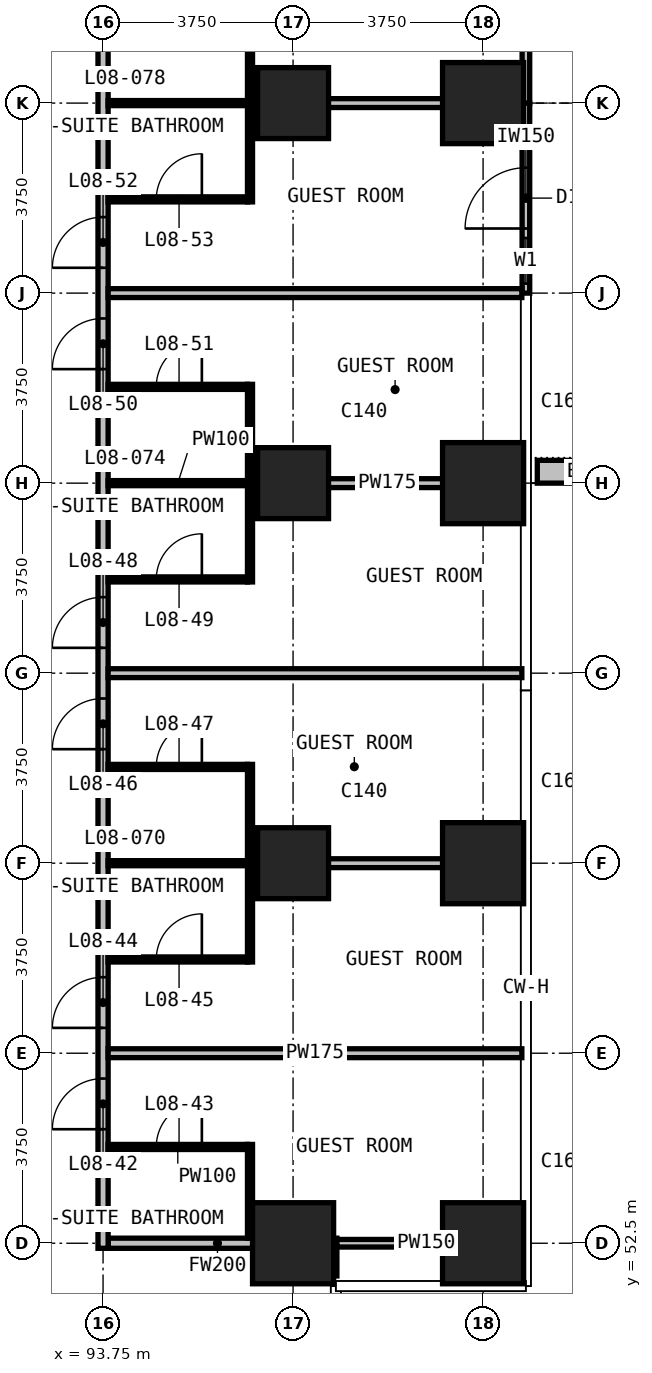
"""IFC4 building model, lengths in metres.
Left out: names, types, materials, properties, quantities, classifications, styles, units other than length and angle.
Written with IfcOpenShell. Run it as: python <this file> out.ifc"""

import sys

from ifc_helpers import new_model, si_unit, direction, frame, frame_2d, origin, origin_2d, place, context, subcontext, project, spatial, rectangle, extrude, element, fill, save


model = new_model("IFC4")
c1 = context("Model", 3, precision=1e-05, world=origin(), true_north=direction((0.0, 1.0)))
c2 = subcontext(c1, "Body", "Model", "MODEL_VIEW")
j1 = project(units=[si_unit("LENGTHUNIT", "METRE"), si_unit("PLANEANGLEUNIT", "RADIAN")], contexts=[c1])
p1 = place(None, origin())
s1 = spatial("IfcSite", under=j1, at=p1, CompositionType="ELEMENT")
p2 = place(p1, origin())
s2 = spatial("IfcBuilding", under=s1, at=p2, CompositionType="ELEMENT")
p3 = place(p2, frame((0.0, 0.0, 46.1)))
s3 = spatial("IfcBuildingStorey", under=s2, at=p3, CompositionType="ELEMENT", Elevation=46.1)
p4 = place(p3, frame((97.5, 52.5, 0.0), z_axis=(0.0, 0.0, 1.0), x_axis=(1.0, 0.0, 0.0)))
e1 = element("IfcColumn", 1, at=p4, inside=s3, PredefinedType="COLUMN", context=c2, shape_type="SweptSolid", body=[
    extrude(rectangle(XDim=1.6, YDim=1.6, at=origin_2d()), origin(), (0.0, 0.0, 1.0), 3.3),
])
for number, where, z_axis, x_axis in (
    (2, (97.5, 60.0, 0.0), (0.0, 0.0, 1.0), (1.0, 0.0, 0.0)),
    (3, (97.5, 67.5, 0.0), (0.0, 0.0, 1.0), (1.0, 0.0, 0.0)),
    (4, (97.5, 75.0, 0.0), (0.0, 0.0, 1.0), (1.0, 0.0, 0.0)),
):
    element("IfcColumn", number, at=place(p3, frame(where, z_axis=z_axis, x_axis=x_axis)), inside=s3, PredefinedType="COLUMN", context=c2, shape_type="SweptSolid", body=[
        extrude(rectangle(XDim=1.4, YDim=1.4, at=origin_2d()), origin(), (0.0, 0.0, 1.0), 3.3),
    ])
for number, where, z_axis, x_axis in (
    (5, (101.25, 52.5, 0.0), (0.0, 0.0, 1.0), (1.0, 0.0, 0.0)),
    (6, (101.25, 60.0, 0.0), (0.0, 0.0, 1.0), (1.0, 0.0, 0.0)),
    (7, (101.25, 67.5, 0.0), (0.0, 0.0, 1.0), (1.0, 0.0, 0.0)),
    (8, (101.25, 75.0, 0.0), (0.0, 0.0, 1.0), (1.0, 0.0, 0.0)),
):
    element("IfcColumn", number, at=place(p3, frame(where, z_axis=z_axis, x_axis=x_axis)), inside=s3, PredefinedType="COLUMN", context=c2, shape_type="SweptSolid", body=[
        extrude(rectangle(XDim=1.6, YDim=1.6, at=origin_2d()), origin(), (0.0, 0.0, 1.0), 3.3),
    ])
p5 = place(p3, frame((102.095, 71.25, 0.0), z_axis=(0.0, 0.0, 1.0), x_axis=(0.0, 1.0, 0.0)))
e9 = element("IfcWall", 9, at=p5, inside=s3, PredefinedType="SOLIDWALL", context=c2, shape_type="SweptSolid", body=[
    extrude(rectangle(XDim=3.75, YDim=0.15, at=frame_2d((1.875, 0.0))), origin(), (0.0, 0.0, 1.0), 3.0),
])
p6 = place(p5, frame((0.188, 0.0, 0.1)))
e10 = element("IfcOpeningElement", 10, at=p6, cuts=e9, PredefinedType="OPENING", context=c2, shape_type="SweptSolid", body=[
    extrude(rectangle(XDim=0.9, YDim=2.4, at=frame_2d((0.45, 1.2))), frame((0.0, 0.085, 0.0), z_axis=(0.0, -1.0, 0.0), x_axis=(1.0, 0.0, 0.0)), (0.0, 0.0, 1.0), 0.17),
])
p7 = place(p5, frame((1.275, 0.0, 0.0)))
e11 = element("IfcOpeningElement", 11, at=p7, cuts=e9, PredefinedType="OPENING", context=c2, shape_type="SweptSolid", body=[
    extrude(rectangle(XDim=1.2, YDim=2.4, at=frame_2d((0.6, 1.2))), frame((0.0, 0.085, 0.0), z_axis=(0.0, -1.0, 0.0), x_axis=(1.0, 0.0, 0.0)), (0.0, 0.0, 1.0), 0.17),
])
p8 = place(p3, frame((102.095, 75.0, 0.0), z_axis=(0.0, 0.0, 1.0), x_axis=(0.0, 1.0, 0.0)))
e12 = element("IfcWall", 12, at=p8, inside=s3, PredefinedType="SOLIDWALL", context=c2, shape_type="SweptSolid", body=[
    extrude(rectangle(XDim=3.75, YDim=0.15, at=frame_2d((1.875, 0.0))), origin(), (0.0, 0.0, 1.0), 3.0),
])
p9 = place(p8, frame((1.275, 0.0, 0.0)))
e13 = element("IfcOpeningElement", 13, at=p9, cuts=e12, PredefinedType="OPENING", context=c2, shape_type="SweptSolid", body=[
    extrude(rectangle(XDim=1.2, YDim=2.4, at=frame_2d((0.6, 1.2))), frame((0.0, 0.085, 0.0), z_axis=(0.0, -1.0, 0.0), x_axis=(1.0, 0.0, 0.0)), (0.0, 0.0, 1.0), 0.17),
])
p10 = place(p8, frame((2.663, 0.0, 0.1)))
e14 = element("IfcOpeningElement", 14, at=p10, cuts=e12, PredefinedType="OPENING", context=c2, shape_type="SweptSolid", body=[
    extrude(rectangle(XDim=0.9, YDim=2.4, at=frame_2d((0.45, 1.2))), frame((0.0, 0.085, 0.0), z_axis=(0.0, -1.0, 0.0), x_axis=(1.0, 0.0, 0.0)), (0.0, 0.0, 1.0), 0.17),
])
p11 = place(p3, frame((102.32, 67.725, 0.0), z_axis=(0.0, 0.0, 1.0), x_axis=(1.0, 0.0, 0.0)))
e15 = element("IfcWall", 15, at=p11, inside=s3, PredefinedType="USERDEFINED", context=c2, shape_type="SweptSolid", body=[
    extrude(rectangle(XDim=2.33, YDim=0.45, at=frame_2d((1.165, 0.0))), origin(), (0.0, 0.0, 1.0), 1.1),
])
p12 = place(p3, frame((93.85, 52.5, 0.0), z_axis=(0.0, 0.0, 1.0), x_axis=(1.0, 0.0, 0.0)))
e16 = element("IfcWall", 16, at=p12, inside=s3, PredefinedType="PARTITIONING", context=c2, shape_type="SweptSolid", body=[
    extrude(rectangle(XDim=4.315, YDim=0.2, at=frame_2d((2.157, 0.0))), origin(), (0.0, 0.0, 1.0), 3.0),
])
p13 = place(p3, frame((93.75, 52.4, 0.0), z_axis=(0.0, 0.0, 1.0), x_axis=(0.0, 1.0, 0.0)))
e17 = element("IfcWall", 17, at=p13, inside=s3, PredefinedType="PARTITIONING", context=c2, shape_type="SweptSolid", body=[
    extrude(rectangle(XDim=33.925, YDim=0.2, at=frame_2d((16.962, 0.0))), origin(), (0.0, 0.0, 1.0), 3.0),
])
p14 = place(p13, frame((2.35, 0.0, 0.0)))
e18 = element("IfcOpeningElement", 18, at=p14, cuts=e17, PredefinedType="OPENING", context=c2, shape_type="SweptSolid", body=[
    extrude(rectangle(XDim=1.0, YDim=2.2, at=frame_2d((0.5, 1.1))), frame((0.0, 0.11, 0.0), z_axis=(0.0, -1.0, 0.0), x_axis=(1.0, 0.0, 0.0)), (0.0, 0.0, 1.0), 0.22),
])
p15 = place(p13, frame((4.35, 0.0, 0.0)))
e19 = element("IfcOpeningElement", 19, at=p15, cuts=e17, PredefinedType="OPENING", context=c2, shape_type="SweptSolid", body=[
    extrude(rectangle(XDim=1.0, YDim=2.2, at=frame_2d((0.5, 1.1))), frame((0.0, 0.11, 0.0), z_axis=(0.0, -1.0, 0.0), x_axis=(1.0, 0.0, 0.0)), (0.0, 0.0, 1.0), 0.22),
])
p16 = place(p13, frame((9.85, 0.0, 0.0)))
e20 = element("IfcOpeningElement", 20, at=p16, cuts=e17, PredefinedType="OPENING", context=c2, shape_type="SweptSolid", body=[
    extrude(rectangle(XDim=1.0, YDim=2.2, at=frame_2d((0.5, 1.1))), frame((0.0, 0.11, 0.0), z_axis=(0.0, -1.0, 0.0), x_axis=(1.0, 0.0, 0.0)), (0.0, 0.0, 1.0), 0.22),
])
p17 = place(p13, frame((11.85, 0.0, 0.0)))
e21 = element("IfcOpeningElement", 21, at=p17, cuts=e17, PredefinedType="OPENING", context=c2, shape_type="SweptSolid", body=[
    extrude(rectangle(XDim=1.0, YDim=2.2, at=frame_2d((0.5, 1.1))), frame((0.0, 0.11, 0.0), z_axis=(0.0, -1.0, 0.0), x_axis=(1.0, 0.0, 0.0)), (0.0, 0.0, 1.0), 0.22),
])
p18 = place(p13, frame((17.35, 0.0, 0.0)))
e22 = element("IfcOpeningElement", 22, at=p18, cuts=e17, PredefinedType="OPENING", context=c2, shape_type="SweptSolid", body=[
    extrude(rectangle(XDim=1.0, YDim=2.2, at=frame_2d((0.5, 1.1))), frame((0.0, 0.11, 0.0), z_axis=(0.0, -1.0, 0.0), x_axis=(1.0, 0.0, 0.0)), (0.0, 0.0, 1.0), 0.22),
])
p19 = place(p13, frame((19.35, 0.0, 0.0)))
e23 = element("IfcOpeningElement", 23, at=p19, cuts=e17, PredefinedType="OPENING", context=c2, shape_type="SweptSolid", body=[
    extrude(rectangle(XDim=1.0, YDim=2.2, at=frame_2d((0.5, 1.1))), frame((0.0, 0.11, 0.0), z_axis=(0.0, -1.0, 0.0), x_axis=(1.0, 0.0, 0.0)), (0.0, 0.0, 1.0), 0.22),
])
p20 = place(p13, frame((24.85, 0.0, 0.0)))
e24 = element("IfcOpeningElement", 24, at=p20, cuts=e17, PredefinedType="OPENING", context=c2, shape_type="SweptSolid", body=[
    extrude(rectangle(XDim=1.0, YDim=2.2, at=frame_2d((0.5, 1.1))), frame((0.0, 0.11, 0.0), z_axis=(0.0, -1.0, 0.0), x_axis=(1.0, 0.0, 0.0)), (0.0, 0.0, 1.0), 0.22),
])
p21 = place(p13, frame((26.85, 0.0, 0.0)))
e25 = element("IfcOpeningElement", 25, at=p21, cuts=e17, PredefinedType="OPENING", context=c2, shape_type="SweptSolid", body=[
    extrude(rectangle(XDim=1.0, YDim=2.2, at=frame_2d((0.5, 1.1))), frame((0.0, 0.11, 0.0), z_axis=(0.0, -1.0, 0.0), x_axis=(1.0, 0.0, 0.0)), (0.0, 0.0, 1.0), 0.22),
])
p22 = place(p13, frame((31.55, 0.0, 0.0)))
e26 = element("IfcOpeningElement", 26, at=p22, cuts=e17, PredefinedType="OPENING", context=c2, shape_type="SweptSolid", body=[
    extrude(rectangle(XDim=0.9, YDim=2.2, at=frame_2d((0.45, 1.1))), frame((0.0, 0.11, 0.0), z_axis=(0.0, -1.0, 0.0), x_axis=(1.0, 0.0, 0.0)), (0.0, 0.0, 1.0), 0.22),
])
p23 = place(p3, frame((98.265, 51.855, 0.0), z_axis=(0.0, 0.0, 1.0), x_axis=(0.0, 1.0, 0.0)))
e27 = element("IfcWall", 27, at=p23, inside=s3, PredefinedType="PARTITIONING", context=c2, shape_type="SweptSolid", body=[
    extrude(rectangle(XDim=0.745, YDim=0.2, at=frame_2d((0.373, 0.0))), origin(), (0.0, 0.0, 1.0), 3.0),
])
p24 = place(p3, frame((93.85, 56.25, 0.0), z_axis=(0.0, 0.0, 1.0), x_axis=(1.0, 0.0, 0.0)))
e28 = element("IfcWall", 28, at=p24, inside=s3, PredefinedType="PARTITIONING", context=c2, shape_type="SweptSolid", body=[
    extrude(rectangle(XDim=8.165, YDim=0.175, at=frame_2d((4.083, 0.0))), origin(), (0.0, 0.0, 1.0), 3.0),
])
p25 = place(p3, frame((96.7, 60.0, 0.0), z_axis=(0.0, 0.0, 1.0), x_axis=(1.0, 0.0, 0.0)))
e29 = element("IfcWall", 29, at=p25, inside=s3, PredefinedType="PARTITIONING", context=c2, shape_type="SweptSolid", body=[
    extrude(rectangle(XDim=5.315, YDim=0.175, at=frame_2d((2.657, 0.0))), origin(), (0.0, 0.0, 1.0), 3.0),
])
p26 = place(p3, frame((93.85, 63.75, 0.0), z_axis=(0.0, 0.0, 1.0), x_axis=(1.0, 0.0, 0.0)))
e30 = element("IfcWall", 30, at=p26, inside=s3, PredefinedType="PARTITIONING", context=c2, shape_type="SweptSolid", body=[
    extrude(rectangle(XDim=8.165, YDim=0.175, at=frame_2d((4.083, 0.0))), origin(), (0.0, 0.0, 1.0), 3.0),
])
p27 = place(p3, frame((96.7, 67.5, 0.0), z_axis=(0.0, 0.0, 1.0), x_axis=(1.0, 0.0, 0.0)))
e31 = element("IfcWall", 31, at=p27, inside=s3, PredefinedType="PARTITIONING", context=c2, shape_type="SweptSolid", body=[
    extrude(rectangle(XDim=5.315, YDim=0.175, at=frame_2d((2.657, 0.0))), origin(), (0.0, 0.0, 1.0), 3.0),
])
p28 = place(p3, frame((93.85, 71.25, 0.0), z_axis=(0.0, 0.0, 1.0), x_axis=(1.0, 0.0, 0.0)))
e32 = element("IfcWall", 32, at=p28, inside=s3, PredefinedType="PARTITIONING", context=c2, shape_type="SweptSolid", body=[
    extrude(rectangle(XDim=8.165, YDim=0.175, at=frame_2d((4.083, 0.0))), origin(), (0.0, 0.0, 1.0), 3.0),
])
p29 = place(p3, frame((96.7, 75.0, 0.0), z_axis=(0.0, 0.0, 1.0), x_axis=(1.0, 0.0, 0.0)))
e33 = element("IfcWall", 33, at=p29, inside=s3, PredefinedType="PARTITIONING", context=c2, shape_type="SweptSolid", body=[
    extrude(rectangle(XDim=5.315, YDim=0.175, at=frame_2d((2.657, 0.0))), origin(), (0.0, 0.0, 1.0), 3.0),
])
p30 = place(p3, frame((98.365, 52.5, 0.0), z_axis=(0.0, 0.0, 1.0), x_axis=(1.0, 0.0, 0.0)))
e34 = element("IfcWall", 34, at=p30, inside=s3, PredefinedType="PARTITIONING", context=c2, shape_type="SweptSolid", body=[
    extrude(rectangle(XDim=3.53, YDim=0.15, at=frame_2d((1.765, 0.0))), origin(), (0.0, 0.0, 1.0), 3.0),
])
p31 = place(p3, frame((93.85, 54.4, 0.0), z_axis=(0.0, 0.0, 1.0), x_axis=(1.0, 0.0, 0.0)))
e35 = element("IfcWall", 35, at=p31, inside=s3, PredefinedType="PARTITIONING", context=c2, shape_type="SweptSolid", body=[
    extrude(rectangle(XDim=2.75, YDim=0.1, at=frame_2d((1.375, 0.0))), origin(), (0.0, 0.0, 1.0), 3.0),
])
p32 = place(p31, frame((0.95, 0.0, 0.0)))
e36 = element("IfcOpeningElement", 36, at=p32, cuts=e35, PredefinedType="OPENING", context=c2, shape_type="SweptSolid", body=[
    extrude(rectangle(XDim=0.9, YDim=2.2, at=frame_2d((0.45, 1.1))), frame((0.0, 0.06, 0.0), z_axis=(0.0, -1.0, 0.0), x_axis=(1.0, 0.0, 0.0)), (0.0, 0.0, 1.0), 0.12),
])
p33 = place(p3, frame((93.85, 58.1, 0.0), z_axis=(0.0, 0.0, 1.0), x_axis=(1.0, 0.0, 0.0)))
e37 = element("IfcWall", 37, at=p33, inside=s3, PredefinedType="PARTITIONING", context=c2, shape_type="SweptSolid", body=[
    extrude(rectangle(XDim=2.75, YDim=0.1, at=frame_2d((1.375, 0.0))), origin(), (0.0, 0.0, 1.0), 3.0),
])
p34 = place(p33, frame((0.95, 0.0, 0.0)))
e38 = element("IfcOpeningElement", 38, at=p34, cuts=e37, PredefinedType="OPENING", context=c2, shape_type="SweptSolid", body=[
    extrude(rectangle(XDim=0.9, YDim=2.2, at=frame_2d((0.45, 1.1))), frame((0.0, 0.06, 0.0), z_axis=(0.0, -1.0, 0.0), x_axis=(1.0, 0.0, 0.0)), (0.0, 0.0, 1.0), 0.12),
])
p35 = place(p3, frame((93.85, 60.0, 0.0), z_axis=(0.0, 0.0, 1.0), x_axis=(1.0, 0.0, 0.0)))
e39 = element("IfcWall", 39, at=p35, inside=s3, PredefinedType="PARTITIONING", context=c2, shape_type="SweptSolid", body=[
    extrude(rectangle(XDim=2.75, YDim=0.1, at=frame_2d((1.375, 0.0))), origin(), (0.0, 0.0, 1.0), 3.0),
])
p36 = place(p3, frame((93.85, 61.9, 0.0), z_axis=(0.0, 0.0, 1.0), x_axis=(1.0, 0.0, 0.0)))
e40 = element("IfcWall", 40, at=p36, inside=s3, PredefinedType="PARTITIONING", context=c2, shape_type="SweptSolid", body=[
    extrude(rectangle(XDim=2.75, YDim=0.1, at=frame_2d((1.375, 0.0))), origin(), (0.0, 0.0, 1.0), 3.0),
])
p37 = place(p36, frame((0.95, 0.0, 0.0)))
e41 = element("IfcOpeningElement", 41, at=p37, cuts=e40, PredefinedType="OPENING", context=c2, shape_type="SweptSolid", body=[
    extrude(rectangle(XDim=0.9, YDim=2.2, at=frame_2d((0.45, 1.1))), frame((0.0, 0.06, 0.0), z_axis=(0.0, -1.0, 0.0), x_axis=(1.0, 0.0, 0.0)), (0.0, 0.0, 1.0), 0.12),
])
p38 = place(p3, frame((93.85, 65.6, 0.0), z_axis=(0.0, 0.0, 1.0), x_axis=(1.0, 0.0, 0.0)))
e42 = element("IfcWall", 42, at=p38, inside=s3, PredefinedType="PARTITIONING", context=c2, shape_type="SweptSolid", body=[
    extrude(rectangle(XDim=2.75, YDim=0.1, at=frame_2d((1.375, 0.0))), origin(), (0.0, 0.0, 1.0), 3.0),
])
p39 = place(p38, frame((0.95, 0.0, 0.0)))
e43 = element("IfcOpeningElement", 43, at=p39, cuts=e42, PredefinedType="OPENING", context=c2, shape_type="SweptSolid", body=[
    extrude(rectangle(XDim=0.9, YDim=2.2, at=frame_2d((0.45, 1.1))), frame((0.0, 0.06, 0.0), z_axis=(0.0, -1.0, 0.0), x_axis=(1.0, 0.0, 0.0)), (0.0, 0.0, 1.0), 0.12),
])
p40 = place(p3, frame((93.85, 67.5, 0.0), z_axis=(0.0, 0.0, 1.0), x_axis=(1.0, 0.0, 0.0)))
e44 = element("IfcWall", 44, at=p40, inside=s3, PredefinedType="PARTITIONING", context=c2, shape_type="SweptSolid", body=[
    extrude(rectangle(XDim=2.75, YDim=0.1, at=frame_2d((1.375, 0.0))), origin(), (0.0, 0.0, 1.0), 3.0),
])
p41 = place(p3, frame((93.85, 69.4, 0.0), z_axis=(0.0, 0.0, 1.0), x_axis=(1.0, 0.0, 0.0)))
e45 = element("IfcWall", 45, at=p41, inside=s3, PredefinedType="PARTITIONING", context=c2, shape_type="SweptSolid", body=[
    extrude(rectangle(XDim=2.75, YDim=0.1, at=frame_2d((1.375, 0.0))), origin(), (0.0, 0.0, 1.0), 3.0),
])
p42 = place(p41, frame((0.95, 0.0, 0.0)))
e46 = element("IfcOpeningElement", 46, at=p42, cuts=e45, PredefinedType="OPENING", context=c2, shape_type="SweptSolid", body=[
    extrude(rectangle(XDim=0.9, YDim=2.2, at=frame_2d((0.45, 1.1))), frame((0.0, 0.06, 0.0), z_axis=(0.0, -1.0, 0.0), x_axis=(1.0, 0.0, 0.0)), (0.0, 0.0, 1.0), 0.12),
])
p43 = place(p3, frame((93.85, 73.1, 0.0), z_axis=(0.0, 0.0, 1.0), x_axis=(1.0, 0.0, 0.0)))
e47 = element("IfcWall", 47, at=p43, inside=s3, PredefinedType="PARTITIONING", context=c2, shape_type="SweptSolid", body=[
    extrude(rectangle(XDim=2.75, YDim=0.1, at=frame_2d((1.375, 0.0))), origin(), (0.0, 0.0, 1.0), 3.0),
])
p44 = place(p43, frame((0.95, 0.0, 0.0)))
e48 = element("IfcOpeningElement", 48, at=p44, cuts=e47, PredefinedType="OPENING", context=c2, shape_type="SweptSolid", body=[
    extrude(rectangle(XDim=0.9, YDim=2.2, at=frame_2d((0.45, 1.1))), frame((0.0, 0.06, 0.0), z_axis=(0.0, -1.0, 0.0), x_axis=(1.0, 0.0, 0.0)), (0.0, 0.0, 1.0), 0.12),
])
p45 = place(p3, frame((93.85, 75.0, 0.0), z_axis=(0.0, 0.0, 1.0), x_axis=(1.0, 0.0, 0.0)))
e49 = element("IfcWall", 49, at=p45, inside=s3, PredefinedType="PARTITIONING", context=c2, shape_type="SweptSolid", body=[
    extrude(rectangle(XDim=2.75, YDim=0.1, at=frame_2d((1.375, 0.0))), origin(), (0.0, 0.0, 1.0), 3.0),
])
p46 = place(p3, frame((96.65, 52.6, 0.0), z_axis=(0.0, 0.0, 1.0), x_axis=(0.0, 1.0, 0.0)))
e50 = element("IfcWall", 50, at=p46, inside=s3, PredefinedType="PARTITIONING", context=c2, shape_type="SweptSolid", body=[
    extrude(rectangle(XDim=1.85, YDim=0.1, at=frame_2d((0.925, 0.0))), origin(), (0.0, 0.0, 1.0), 3.0),
])
for number, where, z_axis, x_axis in (
    (51, (96.65, 58.05, 0.0), (0.0, 0.0, 1.0), (0.0, 1.0, 0.0)),
    (52, (96.65, 65.55, 0.0), (0.0, 0.0, 1.0), (0.0, 1.0, 0.0)),
    (53, (96.65, 73.05, 0.0), (0.0, 0.0, 1.0), (0.0, 1.0, 0.0)),
):
    element("IfcWall", number, at=place(p3, frame(where, z_axis=z_axis, x_axis=x_axis)), inside=s3, PredefinedType="PARTITIONING", context=c2, shape_type="SweptSolid", body=[
        extrude(rectangle(XDim=3.9, YDim=0.1, at=frame_2d((1.95, 0.0))), origin(), (0.0, 0.0, 1.0), 3.0),
    ])
p47 = place(p6, origin())
e54 = element("IfcWindow", 54, at=p47, inside=s3, PartitioningType="SINGLE_PANEL", PredefinedType="WINDOW", context=c2, shape_type="SweptSolid", body=[
    extrude(rectangle(XDim=0.9, YDim=2.4, at=frame_2d((0.45, 1.2))), frame((0.0, 0.03, 0.0), z_axis=(0.0, -1.0, 0.0), x_axis=(1.0, 0.0, 0.0)), (0.0, 0.0, 1.0), 0.06),
])
fill(e10, e54)
p48 = place(p7, origin())
e55 = element("IfcDoor", 55, at=p48, inside=s3, OperationType="SINGLE_SWING_LEFT", PredefinedType="DOOR", context=c2, shape_type="SweptSolid", body=[
    extrude(rectangle(XDim=1.2, YDim=2.4, at=frame_2d((0.6, 1.2))), frame((0.0, 0.025, 0.0), z_axis=(0.0, -1.0, 0.0), x_axis=(1.0, 0.0, 0.0)), (0.0, 0.0, 1.0), 0.05),
])
fill(e11, e55)
p49 = place(p14, origin())
e56 = element("IfcDoor", 56, at=p49, inside=s3, OperationType="SINGLE_SWING_LEFT", PredefinedType="DOOR", context=c2, shape_type="SweptSolid", body=[
    extrude(rectangle(XDim=1.0, YDim=2.2, at=frame_2d((0.5, 1.1))), frame((0.0, 0.025, 0.0), z_axis=(0.0, -1.0, 0.0), x_axis=(1.0, 0.0, 0.0)), (0.0, 0.0, 1.0), 0.05),
])
fill(e18, e56)
p50 = place(p32, origin())
e57 = element("IfcDoor", 57, at=p50, inside=s3, OperationType="SINGLE_SWING_RIGHT", PredefinedType="DOOR", context=c2, shape_type="SweptSolid", body=[
    extrude(rectangle(XDim=0.9, YDim=2.2, at=frame_2d((0.45, 1.1))), frame((0.0, 0.025, 0.0), z_axis=(0.0, -1.0, 0.0), x_axis=(1.0, 0.0, 0.0)), (0.0, 0.0, 1.0), 0.05),
])
fill(e36, e57)
p51 = place(p15, origin())
e58 = element("IfcDoor", 58, at=p51, inside=s3, OperationType="SINGLE_SWING_LEFT", PredefinedType="DOOR", context=c2, shape_type="SweptSolid", body=[
    extrude(rectangle(XDim=1.0, YDim=2.2, at=frame_2d((0.5, 1.1))), frame((0.0, 0.025, 0.0), z_axis=(0.0, -1.0, 0.0), x_axis=(1.0, 0.0, 0.0)), (0.0, 0.0, 1.0), 0.05),
])
fill(e19, e58)
p52 = place(p34, origin())
e59 = element("IfcDoor", 59, at=p52, inside=s3, OperationType="SINGLE_SWING_RIGHT", PredefinedType="DOOR", context=c2, shape_type="SweptSolid", body=[
    extrude(rectangle(XDim=0.9, YDim=2.2, at=frame_2d((0.45, 1.1))), frame((0.0, 0.025, 0.0), z_axis=(0.0, -1.0, 0.0), x_axis=(1.0, 0.0, 0.0)), (0.0, 0.0, 1.0), 0.05),
])
fill(e38, e59)
p53 = place(p16, origin())
e60 = element("IfcDoor", 60, at=p53, inside=s3, OperationType="SINGLE_SWING_LEFT", PredefinedType="DOOR", context=c2, shape_type="SweptSolid", body=[
    extrude(rectangle(XDim=1.0, YDim=2.2, at=frame_2d((0.5, 1.1))), frame((0.0, 0.025, 0.0), z_axis=(0.0, -1.0, 0.0), x_axis=(1.0, 0.0, 0.0)), (0.0, 0.0, 1.0), 0.05),
])
fill(e20, e60)
p54 = place(p37, origin())
e61 = element("IfcDoor", 61, at=p54, inside=s3, OperationType="SINGLE_SWING_RIGHT", PredefinedType="DOOR", context=c2, shape_type="SweptSolid", body=[
    extrude(rectangle(XDim=0.9, YDim=2.2, at=frame_2d((0.45, 1.1))), frame((0.0, 0.025, 0.0), z_axis=(0.0, -1.0, 0.0), x_axis=(1.0, 0.0, 0.0)), (0.0, 0.0, 1.0), 0.05),
])
fill(e41, e61)
p55 = place(p17, origin())
e62 = element("IfcDoor", 62, at=p55, inside=s3, OperationType="SINGLE_SWING_LEFT", PredefinedType="DOOR", context=c2, shape_type="SweptSolid", body=[
    extrude(rectangle(XDim=1.0, YDim=2.2, at=frame_2d((0.5, 1.1))), frame((0.0, 0.025, 0.0), z_axis=(0.0, -1.0, 0.0), x_axis=(1.0, 0.0, 0.0)), (0.0, 0.0, 1.0), 0.05),
])
fill(e21, e62)
p56 = place(p39, origin())
e63 = element("IfcDoor", 63, at=p56, inside=s3, OperationType="SINGLE_SWING_RIGHT", PredefinedType="DOOR", context=c2, shape_type="SweptSolid", body=[
    extrude(rectangle(XDim=0.9, YDim=2.2, at=frame_2d((0.45, 1.1))), frame((0.0, 0.025, 0.0), z_axis=(0.0, -1.0, 0.0), x_axis=(1.0, 0.0, 0.0)), (0.0, 0.0, 1.0), 0.05),
])
fill(e43, e63)
p57 = place(p18, origin())
e64 = element("IfcDoor", 64, at=p57, inside=s3, OperationType="SINGLE_SWING_LEFT", PredefinedType="DOOR", context=c2, shape_type="SweptSolid", body=[
    extrude(rectangle(XDim=1.0, YDim=2.2, at=frame_2d((0.5, 1.1))), frame((0.0, 0.025, 0.0), z_axis=(0.0, -1.0, 0.0), x_axis=(1.0, 0.0, 0.0)), (0.0, 0.0, 1.0), 0.05),
])
fill(e22, e64)
p58 = place(p42, origin())
e65 = element("IfcDoor", 65, at=p58, inside=s3, OperationType="SINGLE_SWING_RIGHT", PredefinedType="DOOR", context=c2, shape_type="SweptSolid", body=[
    extrude(rectangle(XDim=0.9, YDim=2.2, at=frame_2d((0.45, 1.1))), frame((0.0, 0.025, 0.0), z_axis=(0.0, -1.0, 0.0), x_axis=(1.0, 0.0, 0.0)), (0.0, 0.0, 1.0), 0.05),
])
fill(e46, e65)
p59 = place(p19, origin())
e66 = element("IfcDoor", 66, at=p59, inside=s3, OperationType="SINGLE_SWING_LEFT", PredefinedType="DOOR", context=c2, shape_type="SweptSolid", body=[
    extrude(rectangle(XDim=1.0, YDim=2.2, at=frame_2d((0.5, 1.1))), frame((0.0, 0.025, 0.0), z_axis=(0.0, -1.0, 0.0), x_axis=(1.0, 0.0, 0.0)), (0.0, 0.0, 1.0), 0.05),
])
fill(e23, e66)
p60 = place(p44, origin())
e67 = element("IfcDoor", 67, at=p60, inside=s3, OperationType="SINGLE_SWING_RIGHT", PredefinedType="DOOR", context=c2, shape_type="SweptSolid", body=[
    extrude(rectangle(XDim=0.9, YDim=2.2, at=frame_2d((0.45, 1.1))), frame((0.0, 0.025, 0.0), z_axis=(0.0, -1.0, 0.0), x_axis=(1.0, 0.0, 0.0)), (0.0, 0.0, 1.0), 0.05),
])
fill(e48, e67)
save(model, sys.argv[1])
